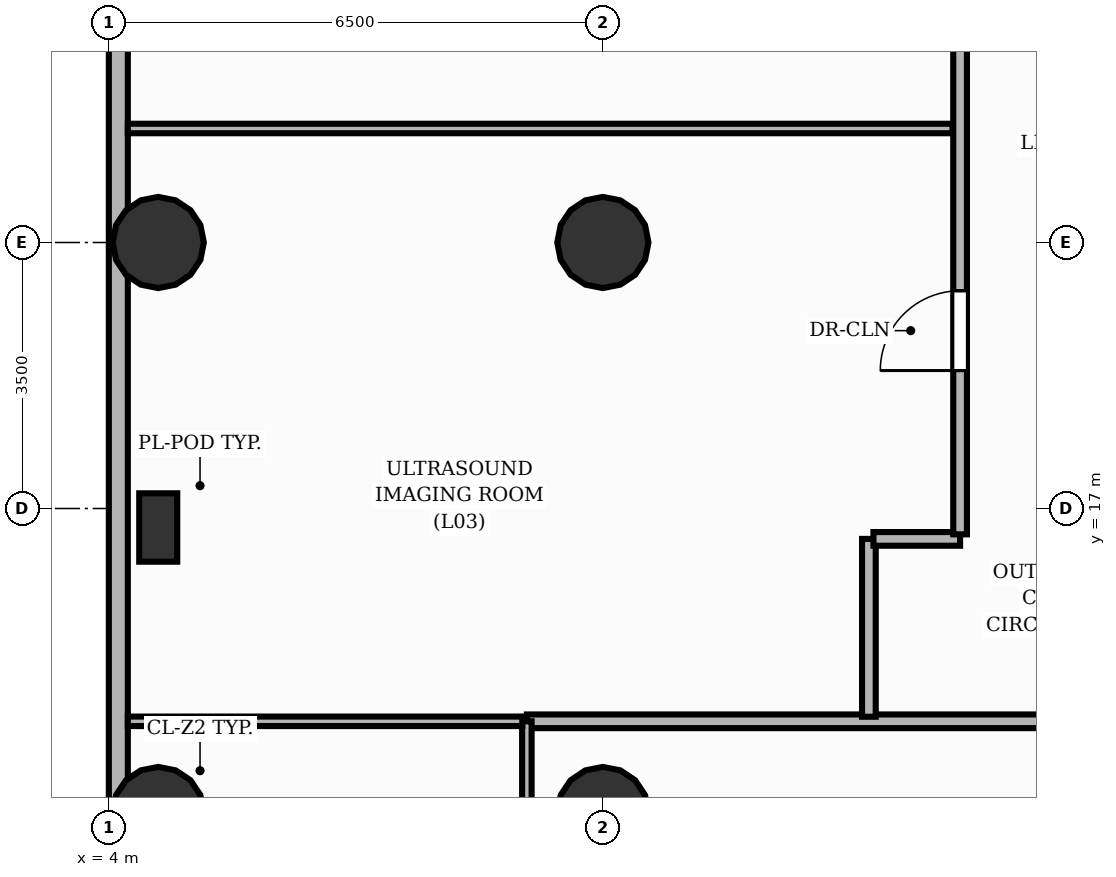
"""IFC4 building model, lengths in metres.
Left out: names, types, materials, properties, quantities, classifications, styles, units other than length and angle.
Written with IfcOpenShell. Run it as: python <this file> out.ifc"""

import sys

from ifc_helpers import new_model, si_unit, direction, frame, frame_2d, origin, origin_2d, place, context, subcontext, project, spatial, rectangle, circle, extrude, element, fill, save


model = new_model("IFC4")
c1 = context("Model", 3, precision=1e-05, world=origin(), true_north=direction((0.0, 1.0)))
c2 = subcontext(c1, "Body", "Model", "MODEL_VIEW")
j1 = project(units=[si_unit("LENGTHUNIT", "METRE"), si_unit("PLANEANGLEUNIT", "RADIAN")], contexts=[c1])
p1 = place(None, origin())
s1 = spatial("IfcSite", under=j1, at=p1, CompositionType="ELEMENT")
p2 = place(p1, origin())
s2 = spatial("IfcBuilding", under=s1, at=p2, CompositionType="ELEMENT")
p3 = place(p2, frame((0.0, 0.0, 12.0)))
s3 = spatial("IfcBuildingStorey", under=s2, at=p3, CompositionType="ELEMENT", Elevation=12.0)
for number, where, z_axis, x_axis in (
    (1, (4.65, 13.0, 0.0), (0.0, 0.0, 1.0), (1.0, 0.0, 0.0)),
    (2, (4.65, 20.5, 0.0), (0.0, 0.0, 1.0), (1.0, 0.0, 0.0)),
    (3, (10.5, 13.0, 0.0), (0.0, 0.0, 1.0), (1.0, 0.0, 0.0)),
    (4, (10.5, 20.5, 0.0), (0.0, 0.0, 1.0), (1.0, 0.0, 0.0)),
):
    element("IfcColumn", number, at=place(p3, frame(where, z_axis=z_axis, x_axis=x_axis)), inside=s3, PredefinedType="COLUMN", context=c2, shape_type="SweptSolid", body=[
        extrude(circle(Radius=0.6, at=origin_2d()), origin(), (0.0, 0.0, 1.0), 4.0),
    ])
p4 = place(p3, frame((4.65, 16.75, 0.0), z_axis=(0.0, 0.0, 1.0), x_axis=(1.0, 0.0, 0.0)))
e5 = element("IfcColumn", 5, at=p4, inside=s3, PredefinedType="PILASTER", context=c2, shape_type="SweptSolid", body=[
    extrude(rectangle(XDim=0.5, YDim=0.9, at=origin_2d()), origin(), (0.0, 0.0, 1.0), 4.0),
])
p5 = place(p3, frame((4.125, 8.9, 0.0), z_axis=(0.0, 0.0, 1.0), x_axis=(0.0, 1.0, 0.0)))
e6 = element("IfcWall", 6, at=p5, inside=s3, PredefinedType="SOLIDWALL", context=c2, shape_type="SweptSolid", body=[
    extrude(rectangle(XDim=30.2, YDim=0.25, at=frame_2d((15.1, 0.0))), origin(), (0.0, 0.0, 1.0), 3.72),
])
p6 = place(p5, frame((23.26, 0.0, 0.9)))
e7 = element("IfcOpeningElement", 7, at=p6, cuts=e6, PredefinedType="OPENING", context=c2, shape_type="SweptSolid", body=[
    extrude(rectangle(XDim=1.8, YDim=1.8, at=frame_2d((0.9, 0.9))), frame((0.0, 0.135, 0.0), z_axis=(0.0, -1.0, 0.0), x_axis=(1.0, 0.0, 0.0)), (0.0, 0.0, 1.0), 0.27),
])
p7 = place(p3, frame((41.02, 14.2, 0.0), z_axis=(0.0, 0.0, 1.0), x_axis=(-1.0, 0.0, 0.0)))
e8 = element("IfcWall", 8, at=p7, inside=s3, PredefinedType="PARTITIONING", context=c2, shape_type="SweptSolid", body=[
    extrude(rectangle(XDim=31.52, YDim=0.18, at=frame_2d((15.76, 0.0))), origin(), (0.0, 0.0, 1.0), 3.715),
])
p8 = place(p7, frame((20.085, 0.0, 0.0)))
e9 = element("IfcOpeningElement", 9, at=p8, cuts=e8, PredefinedType="OPENING", context=c2, shape_type="SweptSolid", body=[
    extrude(rectangle(XDim=1.05, YDim=2.15, at=frame_2d((0.525, 1.075))), frame((0.0, 0.1, 0.0), z_axis=(0.0, -1.0, 0.0), x_axis=(1.0, 0.0, 0.0)), (0.0, 0.0, 1.0), 0.2),
])
p9 = place(p7, frame((13.745, 0.0, 0.0)))
e10 = element("IfcOpeningElement", 10, at=p9, cuts=e8, PredefinedType="OPENING", context=c2, shape_type="SweptSolid", body=[
    extrude(rectangle(XDim=1.05, YDim=2.15, at=frame_2d((0.525, 1.075))), frame((0.0, 0.1, 0.0), z_axis=(0.0, -1.0, 0.0), x_axis=(1.0, 0.0, 0.0)), (0.0, 0.0, 1.0), 0.2),
])
p10 = place(p7, frame((4.745, 0.0, 0.0)))
e11 = element("IfcOpeningElement", 11, at=p10, cuts=e8, PredefinedType="OPENING", context=c2, shape_type="SweptSolid", body=[
    extrude(rectangle(XDim=1.05, YDim=2.15, at=frame_2d((0.525, 1.075))), frame((0.0, 0.1, 0.0), z_axis=(0.0, -1.0, 0.0), x_axis=(1.0, 0.0, 0.0)), (0.0, 0.0, 1.0), 0.2),
])
p11 = place(p3, frame((14.0, 14.26, 0.0), z_axis=(0.0, 0.0, 1.0), x_axis=(0.0, 1.0, 0.0)))
e12 = element("IfcWall", 12, at=p11, inside=s3, PredefinedType="PARTITIONING", context=c2, shape_type="SweptSolid", body=[
    extrude(rectangle(XDim=2.34, YDim=0.18, at=frame_2d((1.17, 0.0))), origin(), (0.0, 0.0, 1.0), 3.715),
])
p12 = place(p3, frame((14.06, 16.6, 0.0), z_axis=(0.0, 0.0, 1.0), x_axis=(1.0, 0.0, 0.0)))
e13 = element("IfcWall", 13, at=p12, inside=s3, PredefinedType="PARTITIONING", context=c2, shape_type="SweptSolid", body=[
    extrude(rectangle(XDim=1.14, YDim=0.18, at=frame_2d((0.57, 0.0))), origin(), (0.0, 0.0, 1.0), 3.008),
])
p13 = place(p3, frame((15.2, 16.66, 0.0), z_axis=(0.0, 0.0, 1.0), x_axis=(0.0, 1.0, 0.0)))
e14 = element("IfcWall", 14, at=p13, inside=s3, PredefinedType="PARTITIONING", context=c2, shape_type="SweptSolid", body=[
    extrude(rectangle(XDim=10.86, YDim=0.18, at=frame_2d((5.43, 0.0))), origin(), (0.0, 0.0, 1.0), 3.715),
])
p14 = place(p13, frame((2.155, 0.0, 0.0)))
e15 = element("IfcOpeningElement", 15, at=p14, cuts=e14, PredefinedType="OPENING", context=c2, shape_type="SweptSolid", body=[
    extrude(rectangle(XDim=1.05, YDim=2.15, at=frame_2d((0.525, 1.075))), frame((0.0, 0.1, 0.0), z_axis=(0.0, -1.0, 0.0), x_axis=(1.0, 0.0, 0.0)), (0.0, 0.0, 1.0), 0.2),
])
p15 = place(p13, frame((7.565, 0.0, 0.0)))
e16 = element("IfcOpeningElement", 16, at=p15, cuts=e14, PredefinedType="OPENING", context=c2, shape_type="SweptSolid", body=[
    extrude(rectangle(XDim=1.05, YDim=2.15, at=frame_2d((0.525, 1.075))), frame((0.0, 0.1, 0.0), z_axis=(0.0, -1.0, 0.0), x_axis=(1.0, 0.0, 0.0)), (0.0, 0.0, 1.0), 0.2),
])
p16 = place(p3, frame((9.5, 14.2, 0.0), z_axis=(0.0, 0.0, 1.0), x_axis=(0.0, -1.0, 0.0)))
e17 = element("IfcWall", 17, at=p16, inside=s3, PredefinedType="PARTITIONING", context=c2, shape_type="SweptSolid", body=[
    extrude(rectangle(XDim=9.95, YDim=0.125, at=frame_2d((4.975, 0.0))), origin(), (0.0, 0.0, 1.0), 3.715),
])
p17 = place(p16, frame((4.45, 0.0, 0.0)))
e18 = element("IfcOpeningElement", 18, at=p17, cuts=e17, PredefinedType="OPENING", context=c2, shape_type="SweptSolid", body=[
    extrude(rectangle(XDim=1.05, YDim=2.15, at=frame_2d((0.525, 1.075))), frame((0.0, 0.073, 0.0), z_axis=(0.0, -1.0, 0.0), x_axis=(1.0, 0.0, 0.0)), (0.0, 0.0, 1.0), 0.145),
])
p18 = place(p3, frame((4.25, 14.2, 0.0), z_axis=(0.0, 0.0, 1.0), x_axis=(1.0, 0.0, 0.0)))
e19 = element("IfcWall", 19, at=p18, inside=s3, PredefinedType="PARTITIONING", context=c2, shape_type="SweptSolid", body=[
    extrude(rectangle(XDim=5.19, YDim=0.125, at=frame_2d((2.595, 0.0))), origin(), (0.0, 0.0, 1.0), 3.715),
])
p19 = place(p3, frame((4.25, 22.0, 0.0), z_axis=(0.0, 0.0, 1.0), x_axis=(1.0, 0.0, 0.0)))
e20 = element("IfcWall", 20, at=p19, inside=s3, PredefinedType="PARTITIONING", context=c2, shape_type="SweptSolid", body=[
    extrude(rectangle(XDim=10.85, YDim=0.125, at=frame_2d((5.425, 0.0))), origin(), (0.0, 0.0, 1.0), 3.715),
])
p20 = place(p14, origin())
e21 = element("IfcDoor", 21, at=p20, inside=s3, OperationType="SINGLE_SWING_LEFT", PredefinedType="DOOR", context=c2, shape_type="SweptSolid", body=[
    extrude(rectangle(XDim=1.05, YDim=2.15, at=frame_2d((0.525, 1.075))), frame((0.0, 0.025, 0.0), z_axis=(0.0, -1.0, 0.0), x_axis=(1.0, 0.0, 0.0)), (0.0, 0.0, 1.0), 0.05),
])
fill(e15, e21)
save(model, sys.argv[1])
